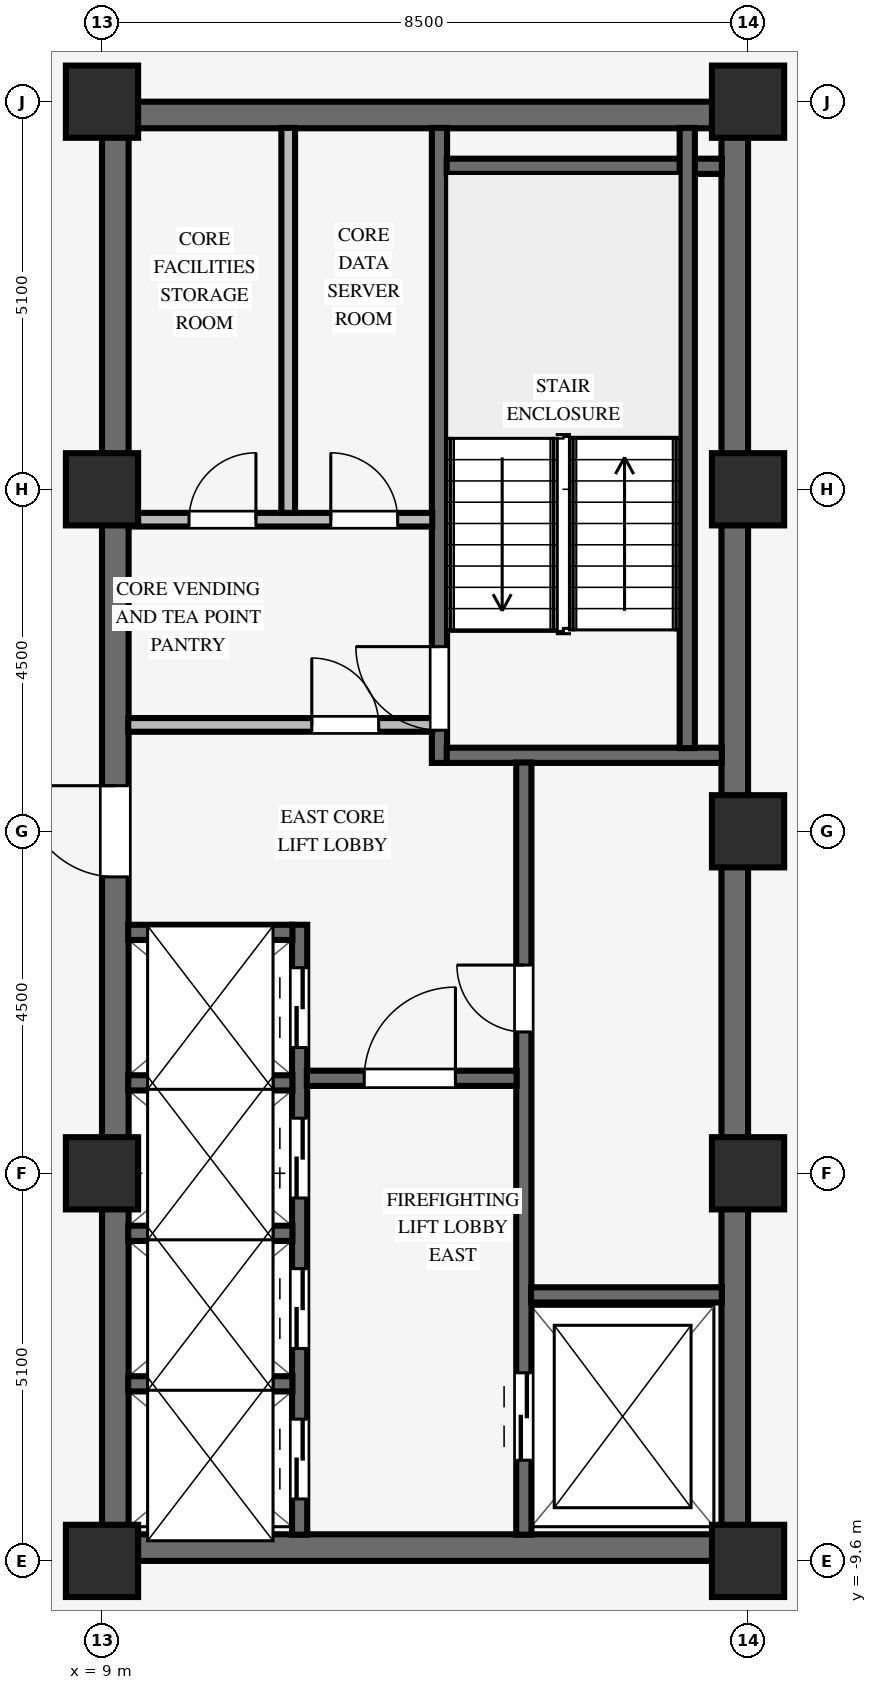
"""IFC4 building model, lengths in metres.
Left out: names, types, materials, properties, quantities, classifications, styles, units other than length and angle.
Written with IfcOpenShell. Run it as: python <this file> out.ifc"""

import sys

from ifc_helpers import new_model, si_unit, direction, frame, frame_2d, origin, origin_2d, place, context, subcontext, project, spatial, rectangle, extrude, source, transform, mapped, element, fill, save


model = new_model("IFC4")
c1 = context("Model", 3, precision=1e-05, world=origin(), true_north=direction((0.0, 1.0)))
c2 = subcontext(c1, "Body", "Model", "MODEL_VIEW")
j1 = project(units=[si_unit("LENGTHUNIT", "METRE"), si_unit("PLANEANGLEUNIT", "RADIAN")], contexts=[c1])
p1 = place(None, origin())
s1 = spatial("IfcSite", under=j1, at=p1, CompositionType="ELEMENT")
p2 = place(p1, origin())
s2 = spatial("IfcBuilding", under=s1, at=p2, CompositionType="ELEMENT")
p3 = place(p2, frame((0.0, 0.0, 205.5)))
s3 = spatial("IfcBuildingStorey", under=s2, at=p3, CompositionType="ELEMENT", Elevation=205.5)
for number, where, z_axis, x_axis in (
    (1, (9.0, -9.425, 0.0), (0.0, 0.0, 1.0), (1.0, 0.0, 0.0)),
    (2, (9.0, 9.425, 0.0), (0.0, 0.0, 1.0), (1.0, 0.0, 0.0)),
):
    element("IfcWall", number, at=place(p3, frame(where, z_axis=z_axis, x_axis=x_axis)), inside=s3, PredefinedType="SHEAR", context=c2, shape_type="SweptSolid", body=[
        extrude(rectangle(XDim=8.5, YDim=0.35, at=frame_2d((4.25, 0.0))), origin(), (0.0, 0.0, 1.0), 3.25),
    ])
p4 = place(p3, frame((9.175, -9.255, 0.0), z_axis=(0.0, 0.0, 1.0), x_axis=(0.0, 1.0, 0.0)))
e3 = element("IfcWall", 3, at=p4, inside=s3, PredefinedType="SHEAR", context=c2, shape_type="SweptSolid", body=[
    extrude(rectangle(XDim=18.51, YDim=0.35, at=frame_2d((9.255, 0.0))), origin(), (0.0, 0.0, 1.0), 3.25),
])
p5 = place(p4, frame((8.655, 0.0, 0.0)))
e4 = element("IfcOpeningElement", 4, at=p5, cuts=e3, PredefinedType="OPENING", context=c2, shape_type="SweptSolid", body=[
    extrude(rectangle(XDim=1.2, YDim=2.15, at=frame_2d((0.6, 1.075))), frame((0.0, 0.185, 0.0), z_axis=(0.0, -1.0, 0.0), x_axis=(1.0, 0.0, 0.0)), (0.0, 0.0, 1.0), 0.37),
])
p6 = place(p3, frame((17.325, -9.255, 0.0), z_axis=(0.0, 0.0, 1.0), x_axis=(0.0, 1.0, 0.0)))
e5 = element("IfcWall", 5, at=p6, inside=s3, PredefinedType="SHEAR", context=c2, shape_type="SweptSolid", body=[
    extrude(rectangle(XDim=18.51, YDim=0.35, at=frame_2d((9.255, 0.0))), origin(), (0.0, 0.0, 1.0), 3.25),
])
for number, where, z_axis, x_axis in (
    (6, (9.0, -9.6, 0.0), (0.0, 0.0, 1.0), (1.0, 0.0, 0.0)),
    (7, (9.0, -4.5, 0.0), (0.0, 0.0, 1.0), (1.0, 0.0, 0.0)),
    (8, (9.0, 4.5, 0.0), (0.0, 0.0, 1.0), (1.0, 0.0, 0.0)),
    (9, (9.0, 9.6, 0.0), (0.0, 0.0, 1.0), (1.0, 0.0, 0.0)),
    (10, (17.5, -9.6, 0.0), (0.0, 0.0, 1.0), (1.0, 0.0, 0.0)),
    (11, (17.5, -4.5, 0.0), (0.0, 0.0, 1.0), (1.0, 0.0, 0.0)),
    (12, (17.5, 4.5, 0.0), (0.0, 0.0, 1.0), (1.0, 0.0, 0.0)),
    (13, (17.5, 9.6, 0.0), (0.0, 0.0, 1.0), (1.0, 0.0, 0.0)),
    (14, (17.5, 0.0, 0.0), (0.0, 0.0, 1.0), (1.0, 0.0, 0.0)),
):
    element("IfcColumn", number, at=place(p3, frame(where, z_axis=z_axis, x_axis=x_axis)), inside=s3, PredefinedType="COLUMN", context=c2, shape_type="SweptSolid", body=[
        extrude(rectangle(XDim=0.95, YDim=0.95, at=origin_2d()), origin(), (0.0, 0.0, 1.0), 3.25),
    ])
p7 = place(p3, frame((13.44, 0.9, 0.0), z_axis=(0.0, 0.0, 1.0), x_axis=(0.0, 1.0, 0.0)))
e15 = element("IfcWall", 15, at=p7, inside=s3, PredefinedType="SHEAR", context=c2, shape_type="SweptSolid", body=[
    extrude(rectangle(XDim=8.355, YDim=0.2, at=frame_2d((4.177, 0.0))), origin(), (0.0, 0.0, 1.0), 3.25),
])
p8 = place(p7, frame((0.43, 0.0, 0.0)))
e16 = element("IfcOpeningElement", 16, at=p8, cuts=e15, PredefinedType="OPENING", context=c2, shape_type="SweptSolid", body=[
    extrude(rectangle(XDim=1.1, YDim=2.15, at=frame_2d((0.55, 1.075))), frame((0.0, 0.11, 0.0), z_axis=(0.0, -1.0, 0.0), x_axis=(1.0, 0.0, 0.0)), (0.0, 0.0, 1.0), 0.22),
])
for number, where, z_axis, x_axis in (
    (17, (13.535, 1.0, 0.0), (0.0, 0.0, 1.0), (1.0, 0.0, 0.0)),
    (18, (13.535, 8.75, 0.0), (0.0, 0.0, 1.0), (1.0, 0.0, 0.0)),
):
    element("IfcWall", number, at=place(p3, frame(where, z_axis=z_axis, x_axis=x_axis)), inside=s3, PredefinedType="SHEAR", context=c2, shape_type="SweptSolid", body=[
        extrude(rectangle(XDim=3.62, YDim=0.2, at=frame_2d((1.81, 0.0))), origin(), (0.0, 0.0, 1.0), 3.25),
    ])
p9 = place(p3, frame((16.7, 1.095, 0.0), z_axis=(0.0, 0.0, 1.0), x_axis=(0.0, 1.0, 0.0)))
e19 = element("IfcWall", 19, at=p9, inside=s3, PredefinedType="SHEAR", context=c2, shape_type="SweptSolid", body=[
    extrude(rectangle(XDim=8.16, YDim=0.2, at=frame_2d((4.08, 0.0))), origin(), (0.0, 0.0, 1.0), 3.25),
])
p10 = place(p3, frame((14.55, -9.255, 0.0), z_axis=(0.0, 0.0, 1.0), x_axis=(0.0, 1.0, 0.0)))
e20 = element("IfcWall", 20, at=p10, inside=s3, PredefinedType="SHEAR", context=c2, shape_type="SweptSolid", body=[
    extrude(rectangle(XDim=10.16, YDim=0.2, at=frame_2d((5.08, 0.0))), origin(), (0.0, 0.0, 1.0), 3.25),
])
p11 = place(p10, frame((6.615, 0.0, 0.0)))
e21 = element("IfcOpeningElement", 21, at=p11, cuts=e20, PredefinedType="OPENING", context=c2, shape_type="SweptSolid", body=[
    extrude(rectangle(XDim=0.88, YDim=2.1, at=frame_2d((0.44, 1.05))), frame((0.0, 0.11, 0.0), z_axis=(0.0, -1.0, 0.0), x_axis=(1.0, 0.0, 0.0)), (0.0, 0.0, 1.0), 0.22),
])
p12 = place(p10, frame((0.98, 0.0, 0.0)))
e22 = element("IfcOpeningElement", 22, at=p12, cuts=e20, PredefinedType="OPENING", context=c2, shape_type="SweptSolid", body=[
    extrude(rectangle(XDim=1.15, YDim=2.15, at=frame_2d((0.575, 1.075))), frame((0.0, 0.11, 0.0), z_axis=(0.0, -1.0, 0.0), x_axis=(1.0, 0.0, 0.0)), (0.0, 0.0, 1.0), 0.22),
])
p13 = place(p3, frame((14.645, -6.1, 0.0), z_axis=(0.0, 0.0, 1.0), x_axis=(1.0, 0.0, 0.0)))
e23 = element("IfcWall", 23, at=p13, inside=s3, PredefinedType="SHEAR", context=c2, shape_type="SweptSolid", body=[
    extrude(rectangle(XDim=2.51, YDim=0.2, at=frame_2d((1.255, 0.0))), origin(), (0.0, 0.0, 1.0), 3.25),
])
p14 = place(p3, frame((11.6, -9.255, 0.0), z_axis=(0.0, 0.0, 1.0), x_axis=(0.0, 1.0, 0.0)))
e24 = element("IfcWall", 24, at=p14, inside=s3, PredefinedType="SHEAR", context=c2, shape_type="SweptSolid", body=[
    extrude(rectangle(XDim=8.025, YDim=0.2, at=frame_2d((4.012, 0.0))), origin(), (0.0, 0.0, 1.0), 3.25),
])
p15 = place(p14, frame((0.47, 0.0, 0.0)))
e25 = element("IfcOpeningElement", 25, at=p15, cuts=e24, PredefinedType="OPENING", context=c2, shape_type="SweptSolid", body=[
    extrude(rectangle(XDim=1.05, YDim=2.15, at=frame_2d((0.525, 1.075))), frame((0.0, 0.11, 0.0), z_axis=(0.0, -1.0, 0.0), x_axis=(1.0, 0.0, 0.0)), (0.0, 0.0, 1.0), 0.22),
])
p16 = place(p14, frame((2.45, 0.0, 0.0)))
e26 = element("IfcOpeningElement", 26, at=p16, cuts=e24, PredefinedType="OPENING", context=c2, shape_type="SweptSolid", body=[
    extrude(rectangle(XDim=1.05, YDim=2.15, at=frame_2d((0.525, 1.075))), frame((0.0, 0.11, 0.0), z_axis=(0.0, -1.0, 0.0), x_axis=(1.0, 0.0, 0.0)), (0.0, 0.0, 1.0), 0.22),
])
p17 = place(p14, frame((4.43, 0.0, 0.0)))
e27 = element("IfcOpeningElement", 27, at=p17, cuts=e24, PredefinedType="OPENING", context=c2, shape_type="SweptSolid", body=[
    extrude(rectangle(XDim=1.05, YDim=2.15, at=frame_2d((0.525, 1.075))), frame((0.0, 0.11, 0.0), z_axis=(0.0, -1.0, 0.0), x_axis=(1.0, 0.0, 0.0)), (0.0, 0.0, 1.0), 0.22),
])
p18 = place(p14, frame((6.41, 0.0, 0.0)))
e28 = element("IfcOpeningElement", 28, at=p18, cuts=e24, PredefinedType="OPENING", context=c2, shape_type="SweptSolid", body=[
    extrude(rectangle(XDim=1.05, YDim=2.15, at=frame_2d((0.525, 1.075))), frame((0.0, 0.11, 0.0), z_axis=(0.0, -1.0, 0.0), x_axis=(1.0, 0.0, 0.0)), (0.0, 0.0, 1.0), 0.22),
])
p19 = place(p3, frame((11.695, -3.25, 0.0), z_axis=(0.0, 0.0, 1.0), x_axis=(1.0, 0.0, 0.0)))
e29 = element("IfcWall", 29, at=p19, inside=s3, PredefinedType="SHEAR", context=c2, shape_type="SweptSolid", body=[
    extrude(rectangle(XDim=2.76, YDim=0.2, at=frame_2d((1.38, 0.0))), origin(), (0.0, 0.0, 1.0), 3.25),
])
p20 = place(p19, frame((0.755, 0.0, 0.0)))
e30 = element("IfcOpeningElement", 30, at=p20, cuts=e29, PredefinedType="OPENING", context=c2, shape_type="SweptSolid", body=[
    extrude(rectangle(XDim=1.2, YDim=2.15, at=frame_2d((0.6, 1.075))), frame((0.0, 0.11, 0.0), z_axis=(0.0, -1.0, 0.0), x_axis=(1.0, 0.0, 0.0)), (0.0, 0.0, 1.0), 0.22),
])
for number, where, z_axis, x_axis in (
    (31, (9.345, -7.27, 0.0), (0.0, 0.0, 1.0), (1.0, 0.0, 0.0)),
    (32, (9.345, -5.29, 0.0), (0.0, 0.0, 1.0), (1.0, 0.0, 0.0)),
    (33, (9.345, -3.31, 0.0), (0.0, 0.0, 1.0), (1.0, 0.0, 0.0)),
    (34, (9.345, -1.33, 0.0), (0.0, 0.0, 1.0), (1.0, 0.0, 0.0)),
):
    element("IfcWall", number, at=place(p3, frame(where, z_axis=z_axis, x_axis=x_axis)), inside=s3, PredefinedType="SHEAR", context=c2, shape_type="SweptSolid", body=[
        extrude(rectangle(XDim=2.16, YDim=0.2, at=frame_2d((1.08, 0.0))), origin(), (0.0, 0.0, 1.0), 3.25),
    ])
p21 = place(p3, frame((9.345, 1.4, 0.0), z_axis=(0.0, 0.0, 1.0), x_axis=(1.0, 0.0, 0.0)))
e35 = element("IfcWall", 35, at=p21, inside=s3, PredefinedType="PARTITIONING", context=c2, shape_type="SweptSolid", body=[
    extrude(rectangle(XDim=4.0, YDim=0.18, at=frame_2d((2.0, 0.0))), origin(), (0.0, 0.0, 1.0), 3.24),
])
p22 = place(p21, frame((2.415, 0.0, 0.0)))
e36 = element("IfcOpeningElement", 36, at=p22, cuts=e35, PredefinedType="OPENING", context=c2, shape_type="SweptSolid", body=[
    extrude(rectangle(XDim=0.88, YDim=2.1, at=frame_2d((0.44, 1.05))), frame((0.0, 0.1, 0.0), z_axis=(0.0, -1.0, 0.0), x_axis=(1.0, 0.0, 0.0)), (0.0, 0.0, 1.0), 0.2),
])
p23 = place(p3, frame((9.345, 4.1, 0.0), z_axis=(0.0, 0.0, 1.0), x_axis=(1.0, 0.0, 0.0)))
e37 = element("IfcWall", 37, at=p23, inside=s3, PredefinedType="PARTITIONING", context=c2, shape_type="SweptSolid", body=[
    extrude(rectangle(XDim=4.0, YDim=0.18, at=frame_2d((2.0, 0.0))), origin(), (0.0, 0.0, 1.0), 3.24),
])
p24 = place(p23, frame((0.8, 0.0, 0.0)))
e38 = element("IfcOpeningElement", 38, at=p24, cuts=e37, PredefinedType="OPENING", context=c2, shape_type="SweptSolid", body=[
    extrude(rectangle(XDim=0.88, YDim=2.1, at=frame_2d((0.44, 1.05))), frame((0.0, 0.1, 0.0), z_axis=(0.0, -1.0, 0.0), x_axis=(1.0, 0.0, 0.0)), (0.0, 0.0, 1.0), 0.2),
])
p25 = place(p23, frame((2.665, 0.0, 0.0)))
e39 = element("IfcOpeningElement", 39, at=p25, cuts=e37, PredefinedType="OPENING", context=c2, shape_type="SweptSolid", body=[
    extrude(rectangle(XDim=0.88, YDim=2.1, at=frame_2d((0.44, 1.05))), frame((0.0, 0.1, 0.0), z_axis=(0.0, -1.0, 0.0), x_axis=(1.0, 0.0, 0.0)), (0.0, 0.0, 1.0), 0.2),
])
p26 = place(p3, frame((11.45, 4.19, 0.0), z_axis=(0.0, 0.0, 1.0), x_axis=(0.0, 1.0, 0.0)))
e40 = element("IfcWall", 40, at=p26, inside=s3, PredefinedType="PARTITIONING", context=c2, shape_type="SweptSolid", body=[
    extrude(rectangle(XDim=5.065, YDim=0.18, at=frame_2d((2.532, 0.0))), origin(), (0.0, 0.0, 1.0), 3.24),
])
m1 = source(origin(), c2, "Body", "SweptSolid", [
    extrude(rectangle(XDim=1.1, YDim=2.15, at=frame_2d((0.55, 1.075))), frame((0.0, 0.025, 0.0), z_axis=(0.0, -1.0, 0.0), x_axis=(1.0, 0.0, 0.0)), (0.0, 0.0, 1.0), 0.05),
])
p27 = place(p8, origin())
e41 = element("IfcDoor", 41, at=p27, inside=s3, OperationType="SINGLE_SWING_RIGHT", PredefinedType="DOOR", context=c2, shape_type="MappedRepresentation", body=[
    mapped(m1, transform((0.0, 0.0, 0.0), scale=1.0)),
])
fill(e16, e41)
m2 = source(origin(), c2, "Body", "SweptSolid", [
    extrude(rectangle(XDim=0.88, YDim=2.1, at=frame_2d((0.44, 1.05))), frame((0.0, 0.025, 0.0), z_axis=(0.0, -1.0, 0.0), x_axis=(1.0, 0.0, 0.0)), (0.0, 0.0, 1.0), 0.05),
])
p28 = place(p11, origin())
e42 = element("IfcDoor", 42, at=p28, inside=s3, OperationType="SINGLE_SWING_RIGHT", PredefinedType="DOOR", context=c2, shape_type="MappedRepresentation", body=[
    mapped(m2, transform((0.0, 0.0, 0.0), scale=1.0)),
])
fill(e21, e42)
m3 = source(origin(), c2, "Body", "SweptSolid", [
    extrude(rectangle(XDim=1.2, YDim=2.15, at=frame_2d((0.6, 1.075))), frame((0.0, 0.025, 0.0), z_axis=(0.0, -1.0, 0.0), x_axis=(1.0, 0.0, 0.0)), (0.0, 0.0, 1.0), 0.05),
])
p29 = place(p20, origin())
e43 = element("IfcDoor", 43, at=p29, inside=s3, OperationType="SINGLE_SWING_RIGHT", PredefinedType="DOOR", context=c2, shape_type="MappedRepresentation", body=[
    mapped(m3, transform((0.0, 0.0, 0.0), scale=1.0)),
])
fill(e30, e43)
p30 = place(p5, origin())
e44 = element("IfcDoor", 44, at=p30, inside=s3, OperationType="SINGLE_SWING_RIGHT", PredefinedType="DOOR", context=c2, shape_type="MappedRepresentation", body=[
    mapped(m3, transform((0.0, 0.0, 0.0), scale=1.0)),
])
fill(e4, e44)
p31 = place(p22, origin())
e45 = element("IfcDoor", 45, at=p31, inside=s3, OperationType="SINGLE_SWING_LEFT", PredefinedType="DOOR", context=c2, shape_type="MappedRepresentation", body=[
    mapped(m2, transform((0.0, 0.0, 0.0), scale=1.0)),
])
fill(e36, e45)
p32 = place(p24, origin())
e46 = element("IfcDoor", 46, at=p32, inside=s3, OperationType="SINGLE_SWING_RIGHT", PredefinedType="DOOR", context=c2, shape_type="MappedRepresentation", body=[
    mapped(m2, transform((0.0, 0.0, 0.0), scale=1.0)),
])
fill(e38, e46)
p33 = place(p25, origin())
e47 = element("IfcDoor", 47, at=p33, inside=s3, OperationType="SINGLE_SWING_LEFT", PredefinedType="DOOR", context=c2, shape_type="MappedRepresentation", body=[
    mapped(m2, transform((0.0, 0.0, 0.0), scale=1.0)),
])
fill(e39, e47)
m4 = source(origin(), c2, "Body", "SweptSolid", [
    extrude(rectangle(XDim=1.15, YDim=2.15, at=frame_2d((0.575, 1.075))), frame((0.0, 0.025, 0.0), z_axis=(0.0, -1.0, 0.0), x_axis=(1.0, 0.0, 0.0)), (0.0, 0.0, 1.0), 0.05),
])
p34 = place(p12, origin())
e48 = element("IfcDoor", 48, at=p34, inside=s3, OperationType="DOUBLE_DOOR_SLIDING", PredefinedType="DOOR", context=c2, shape_type="MappedRepresentation", body=[
    mapped(m4, transform((0.0, 0.0, 0.0), scale=1.0)),
])
fill(e22, e48)
m5 = source(origin(), c2, "Body", "SweptSolid", [
    extrude(rectangle(XDim=1.05, YDim=2.15, at=frame_2d((0.525, 1.075))), frame((0.0, 0.025, 0.0), z_axis=(0.0, -1.0, 0.0), x_axis=(1.0, 0.0, 0.0)), (0.0, 0.0, 1.0), 0.05),
])
p35 = place(p15, origin())
e49 = element("IfcDoor", 49, at=p35, inside=s3, OperationType="DOUBLE_DOOR_SLIDING", PredefinedType="DOOR", context=c2, shape_type="MappedRepresentation", body=[
    mapped(m5, transform((0.0, 0.0, 0.0), scale=1.0)),
])
fill(e25, e49)
p36 = place(p16, origin())
e50 = element("IfcDoor", 50, at=p36, inside=s3, OperationType="DOUBLE_DOOR_SLIDING", PredefinedType="DOOR", context=c2, shape_type="MappedRepresentation", body=[
    mapped(m5, transform((0.0, 0.0, 0.0), scale=1.0)),
])
fill(e26, e50)
p37 = place(p17, origin())
e51 = element("IfcDoor", 51, at=p37, inside=s3, OperationType="DOUBLE_DOOR_SLIDING", PredefinedType="DOOR", context=c2, shape_type="MappedRepresentation", body=[
    mapped(m5, transform((0.0, 0.0, 0.0), scale=1.0)),
])
fill(e27, e51)
p38 = place(p18, origin())
e52 = element("IfcDoor", 52, at=p38, inside=s3, OperationType="DOUBLE_DOOR_SLIDING", PredefinedType="DOOR", context=c2, shape_type="MappedRepresentation", body=[
    mapped(m5, transform((0.0, 0.0, 0.0), scale=1.0)),
])
fill(e28, e52)
save(model, sys.argv[1])
